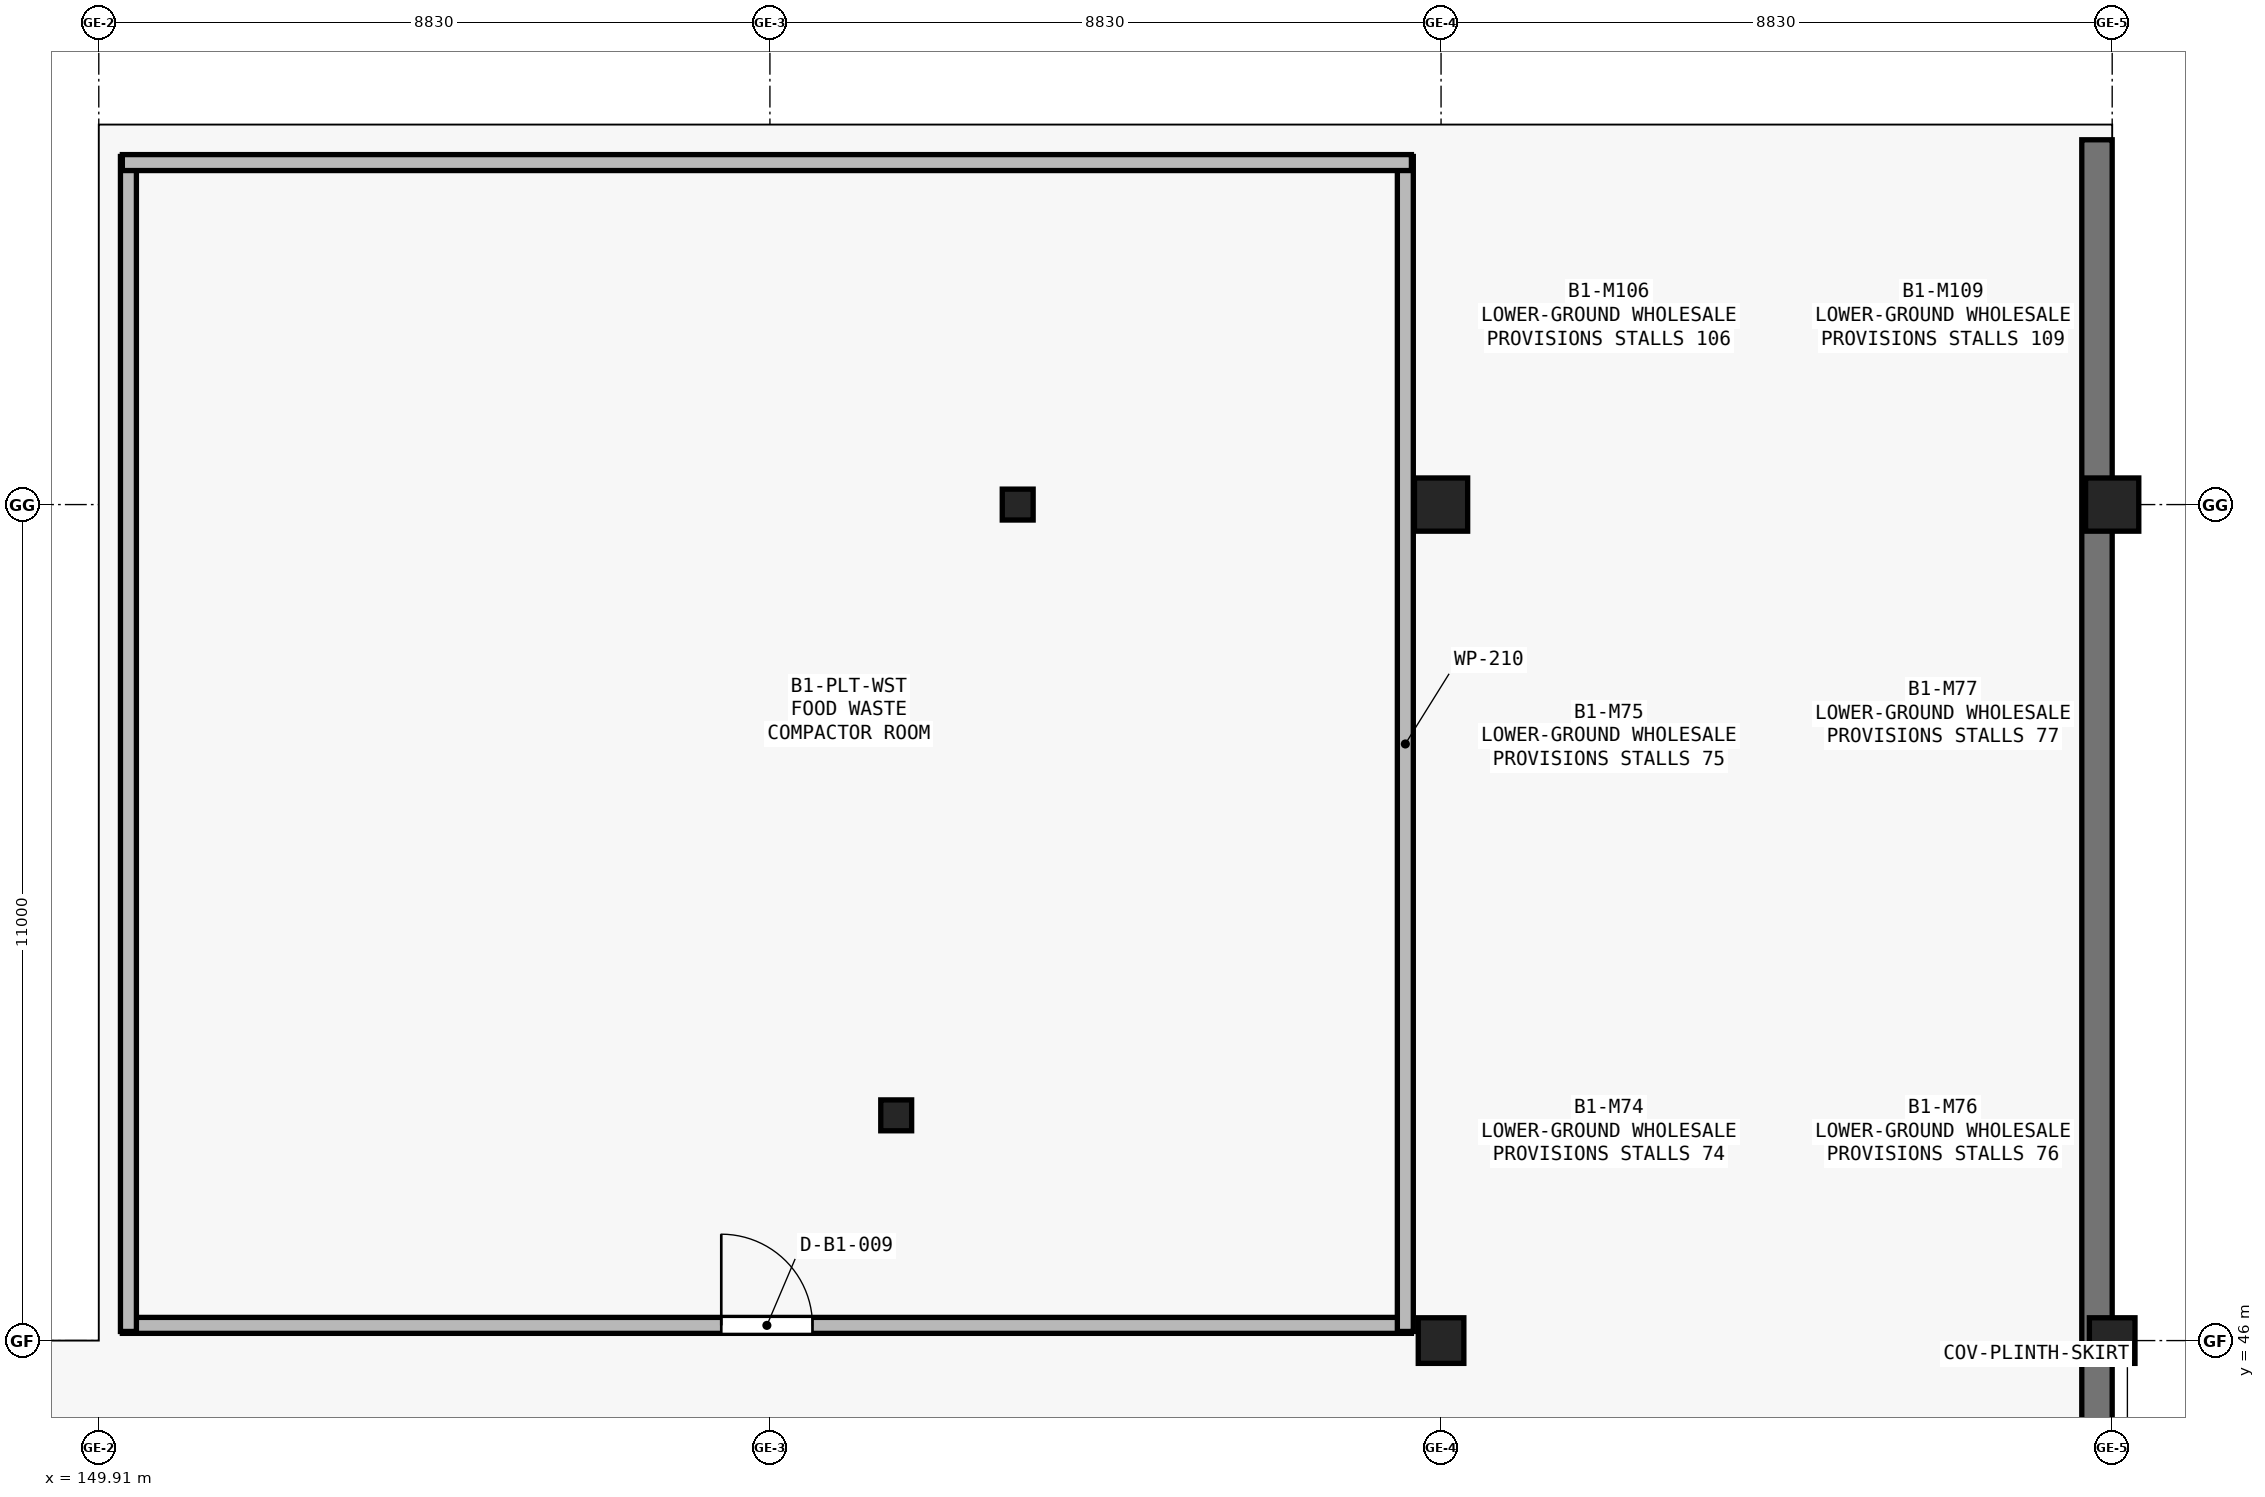
"""IFC4 building model, lengths in metres.
Left out: names, types, materials, properties, quantities, classifications, styles, units other than length and angle.
Written with IfcOpenShell. Run it as: python <this file> out.ifc"""

import sys

from ifc_helpers import new_model, si_unit, direction, frame, frame_2d, origin, origin_2d, place, context, subcontext, project, spatial, rectangle, circle, hollow_circle, extrude, element, fill, save


model = new_model("IFC4")
c1 = context("Model", 3, precision=1e-05, world=origin(), true_north=direction((0.0, 1.0)))
c2 = subcontext(c1, "Body", "Model", "MODEL_VIEW")
j1 = project(units=[si_unit("LENGTHUNIT", "METRE"), si_unit("PLANEANGLEUNIT", "RADIAN")], contexts=[c1])
p1 = place(None, origin())
s1 = spatial("IfcSite", under=j1, at=p1, CompositionType="ELEMENT")
p2 = place(p1, origin())
s2 = spatial("IfcBuilding", under=s1, at=p2, CompositionType="ELEMENT")
p3 = place(p2, frame((0.0, 0.0, -5.4)))
s3 = spatial("IfcBuildingStorey", under=s2, at=p3, CompositionType="ELEMENT", Elevation=-5.4)
p4 = place(p3, frame((167.57, 46.0, 0.0), z_axis=(0.0, 0.0, 1.0), x_axis=(1.0, 0.0, 0.0)))
e1 = element("IfcColumn", 1, at=p4, inside=s3, PredefinedType="COLUMN", context=c2, shape_type="SweptSolid", body=[
    extrude(rectangle(XDim=0.6, YDim=0.6, at=origin_2d()), origin(), (0.0, 0.0, 1.0), 5.4),
])
p5 = place(p3, frame((167.57, 57.0, 0.0), z_axis=(0.0, 0.0, 1.0), x_axis=(1.0, 0.0, 0.0)))
e2 = element("IfcColumn", 2, at=p5, inside=s3, PredefinedType="COLUMN", context=c2, shape_type="SweptSolid", body=[
    extrude(circle(Radius=0.35, at=origin_2d()), origin(), (0.0, 0.0, 1.0), 5.4),
])
p6 = place(p3, frame((176.4, 46.0, 0.0), z_axis=(0.0, 0.0, 1.0), x_axis=(1.0, 0.0, 0.0)))
e3 = element("IfcColumn", 3, at=p6, inside=s3, PredefinedType="COLUMN", context=c2, shape_type="SweptSolid", body=[
    extrude(rectangle(XDim=0.6, YDim=0.6, at=origin_2d()), origin(), (0.0, 0.0, 1.0), 5.4),
])
p7 = place(p3, frame((176.4, 57.0, 0.0), z_axis=(0.0, 0.0, 1.0), x_axis=(1.0, 0.0, 0.0)))
e4 = element("IfcColumn", 4, at=p7, inside=s3, PredefinedType="COLUMN", context=c2, shape_type="SweptSolid", body=[
    extrude(circle(Radius=0.35, at=origin_2d()), origin(), (0.0, 0.0, 1.0), 5.4),
])
for number, where, z_axis, x_axis in (
    (5, (160.402, 48.964, 0.0), (0.0, 0.0, 1.0), (1.0, 0.0, 0.0)),
    (6, (162.0, 57.0, 0.0), (0.0, 0.0, 1.0), (1.0, 0.0, 0.0)),
):
    element("IfcColumn", number, at=place(p3, frame(where, z_axis=z_axis, x_axis=x_axis)), inside=s3, PredefinedType="COLUMN", context=c2, shape_type="SweptSolid", body=[
        extrude(hollow_circle(Radius=0.203, WallThickness=0.012, at=origin_2d()), origin(), (0.0, 0.0, 1.0), 5.4),
    ])
p8 = place(p3, frame((176.2, 61.8, 0.0), z_axis=(0.0, 0.0, 1.0), x_axis=(0.0, -1.0, 0.0)))
e7 = element("IfcWall", 7, at=p8, inside=s3, PredefinedType="USERDEFINED", context=c2, shape_type="SweptSolid", body=[
    extrude(rectangle(XDim=61.6, YDim=0.4, at=frame_2d((30.8, 0.0))), origin(), (0.0, 0.0, 1.0), 4.85),
])
p9 = place(p3, frame((150.22, 46.2, 0.0), z_axis=(0.0, 0.0, 1.0), x_axis=(1.0, 0.0, 0.0)))
e8 = element("IfcWall", 8, at=p9, inside=s3, PredefinedType="PARTITIONING", context=c2, shape_type="SweptSolid", body=[
    extrude(rectangle(XDim=16.96, YDim=0.21, at=frame_2d((8.48, 0.0))), origin(), (0.0, 0.0, 1.0), 4.92),
])
p10 = place(p9, frame((7.88, 0.0, 0.0)))
e9 = element("IfcOpeningElement", 9, at=p10, cuts=e8, PredefinedType="OPENING", context=c2, shape_type="SweptSolid", body=[
    extrude(rectangle(XDim=1.2, YDim=2.1, at=frame_2d((0.6, 1.05))), frame((0.0, 0.115, 0.0), z_axis=(0.0, -1.0, 0.0), x_axis=(1.0, 0.0, 0.0)), (0.0, 0.0, 1.0), 0.23),
])
for number, where, z_axis, x_axis in (
    (10, (167.1, 46.12, 0.0), (0.0, 0.0, 1.0), (0.0, 1.0, 0.0)),
    (11, (150.3, 61.58, 0.0), (0.0, 0.0, 1.0), (0.0, -1.0, 0.0)),
):
    element("IfcWall", number, at=place(p3, frame(where, z_axis=z_axis, x_axis=x_axis)), inside=s3, PredefinedType="PARTITIONING", context=c2, shape_type="SweptSolid", body=[
        extrude(rectangle(XDim=15.46, YDim=0.21, at=frame_2d((7.73, 0.0))), origin(), (0.0, 0.0, 1.0), 4.92),
    ])
p11 = place(p3, frame((167.18, 61.5, 0.0), z_axis=(0.0, 0.0, 1.0), x_axis=(-1.0, 0.0, 0.0)))
e12 = element("IfcWall", 12, at=p11, inside=s3, PredefinedType="PARTITIONING", context=c2, shape_type="SweptSolid", body=[
    extrude(rectangle(XDim=16.96, YDim=0.21, at=frame_2d((8.48, 0.0))), origin(), (0.0, 0.0, 1.0), 4.92),
])
p12 = place(p10, origin())
e13 = element("IfcDoor", 13, at=p12, inside=s3, OperationType="SINGLE_SWING_LEFT", PredefinedType="DOOR", context=c2, shape_type="SweptSolid", body=[
    extrude(rectangle(XDim=1.2, YDim=2.1, at=frame_2d((0.6, 1.05))), frame((0.0, 0.025, 0.0), z_axis=(0.0, -1.0, 0.0), x_axis=(1.0, 0.0, 0.0)), (0.0, 0.0, 1.0), 0.05),
])
fill(e9, e13)
save(model, sys.argv[1])
